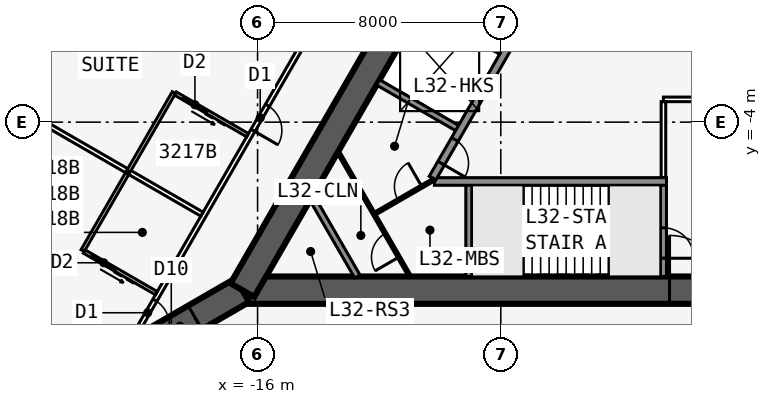
"""IFC4 building model, lengths in metres.
Left out: names, types, materials, properties, quantities, classifications, styles, units other than length and angle.
Written with IfcOpenShell. Run it as: python <this file> out.ifc"""

import sys

from ifc_helpers import new_model, si_unit, direction, frame, frame_2d, origin, place, context, subcontext, project, spatial, rectangle, extrude, element, fill, save


model = new_model("IFC4")
c1 = context("Model", 3, precision=1e-05, world=origin(), true_north=direction((0.0, 1.0)))
c2 = subcontext(c1, "Body", "Model", "MODEL_VIEW")
j1 = project(units=[si_unit("LENGTHUNIT", "METRE"), si_unit("PLANEANGLEUNIT", "RADIAN")], contexts=[c1])
p1 = place(None, origin())
s1 = spatial("IfcSite", under=j1, at=p1, CompositionType="ELEMENT")
p2 = place(p1, origin())
s2 = spatial("IfcBuilding", under=s1, at=p2, CompositionType="ELEMENT")
p3 = place(p2, frame((0.0, 0.0, 124.9)))
s3 = spatial("IfcBuildingStorey", under=s2, at=p3, CompositionType="ELEMENT", Elevation=124.9)
p4 = place(p3, frame((-16.5, -9.526, 0.0), z_axis=(0.0, 0.0, 1.0), x_axis=(1.0, 0.0, 0.0)))
e1 = element("IfcWall", 1, at=p4, inside=s3, PredefinedType="SHEAR", context=c2, shape_type="SweptSolid", body=[
    extrude(rectangle(XDim=33.0, YDim=0.9, at=frame_2d((16.5, 0.0))), origin(), (0.0, 0.0, 1.0), 3.4),
])
p5 = place(p4, frame((14.05, 0.0, 0.0)))
e2 = element("IfcOpeningElement", 2, at=p5, cuts=e1, PredefinedType="OPENING", context=c2, shape_type="SweptSolid", body=[
    extrude(rectangle(XDim=1.8, YDim=2.13, at=frame_2d((0.9, 1.065))), frame((0.0, 0.46, 0.0), z_axis=(0.0, -1.0, 0.0), x_axis=(1.0, 0.0, 0.0)), (0.0, 0.0, 1.0), 0.92),
])
p6 = place(p3, frame((-10.183, -5.951, 0.0), z_axis=(0.0, 0.0, 1.0), x_axis=(1.0, 0.0, 0.0)))
e3 = element("IfcWall", 3, at=p6, inside=s3, PredefinedType="SOLIDWALL", context=c2, shape_type="SweptSolid", body=[
    extrude(rectangle(XDim=7.633, YDim=0.25, at=frame_2d((3.816, 0.0))), origin(), (0.0, 0.0, 1.0), 3.235),
])
p7 = place(p3, frame((-9.05, -5.951, 0.0), z_axis=(0.0, 0.0, 1.0), x_axis=(0.0, -1.0, 0.0)))
e4 = element("IfcWall", 4, at=p7, inside=s3, PredefinedType="SOLIDWALL", context=c2, shape_type="SweptSolid", body=[
    extrude(rectangle(XDim=3.125, YDim=0.2, at=frame_2d((1.562, 0.0))), origin(), (0.0, 0.0, 1.0), 3.235),
])
p8 = place(p3, frame((-2.65, -5.951, 0.0), z_axis=(0.0, 0.0, 1.0), x_axis=(0.0, -1.0, 0.0)))
e5 = element("IfcWall", 5, at=p8, inside=s3, PredefinedType="SOLIDWALL", context=c2, shape_type="SweptSolid", body=[
    extrude(rectangle(XDim=3.125, YDim=0.2, at=frame_2d((1.562, 0.0))), origin(), (0.0, 0.0, 1.0), 3.235),
])
p9 = place(p8, frame((1.525, 0.0, 0.0)))
e6 = element("IfcOpeningElement", 6, at=p9, cuts=e5, PredefinedType="OPENING", context=c2, shape_type="SweptSolid", body=[
    extrude(rectangle(XDim=1.0, YDim=2.13, at=frame_2d((0.5, 1.065))), frame((0.0, 0.11, 0.0), z_axis=(0.0, -1.0, 0.0), x_axis=(1.0, 0.0, 0.0)), (0.0, 0.0, 1.0), 0.22),
])
p10 = place(p3, frame((0.0, 19.052, 0.0), z_axis=(0.0, 0.0, 1.0), x_axis=(-0.499999749417, -0.866025548458, 0.0)))
e7 = element("IfcWall", 7, at=p10, inside=s3, PredefinedType="SHEAR", context=c2, shape_type="SweptSolid", body=[
    extrude(rectangle(XDim=33.0, YDim=0.9, at=frame_2d((16.5, 0.0))), origin(), (0.0, 0.0, 1.0), 3.4),
])
p11 = place(p10, frame((14.15, 0.0, 0.0)))
e8 = element("IfcOpeningElement", 8, at=p11, cuts=e7, PredefinedType="OPENING", context=c2, shape_type="SweptSolid", body=[
    extrude(rectangle(XDim=1.8, YDim=2.13, at=frame_2d((0.9, 1.065))), frame((0.0, 0.46, 0.0), z_axis=(0.0, -1.0, 0.0), x_axis=(1.0, 0.0, 0.0)), (0.0, 0.0, 1.0), 0.92),
])
p12 = place(p10, frame((12.6, 0.0, 0.0)))
e9 = element("IfcOpeningElement", 9, at=p12, cuts=e7, PredefinedType="OPENING", context=c2, shape_type="SweptSolid", body=[
    extrude(rectangle(XDim=1.0, YDim=2.13, at=frame_2d((0.5, 1.065))), frame((0.0, 0.46, 0.0), z_axis=(0.0, -1.0, 0.0), x_axis=(1.0, 0.0, 0.0)), (0.0, 0.0, 1.0), 0.92),
])
p13 = place(p3, frame((-4.929, 3.365, 0.0), z_axis=(0.0, 0.0, 1.0), x_axis=(-0.499991433582, -0.866030349552, 0.0)))
e10 = element("IfcWall", 10, at=p13, inside=s3, PredefinedType="SOLIDWALL", context=c2, shape_type="SweptSolid", body=[
    extrude(rectangle(XDim=10.633, YDim=0.25, at=frame_2d((5.316, 0.0))), origin(), (0.0, 0.0, 1.0), 3.235),
])
p14 = place(p13, frame((9.164, 0.0, 0.0)))
e11 = element("IfcOpeningElement", 11, at=p14, cuts=e10, PredefinedType="OPENING", context=c2, shape_type="SweptSolid", body=[
    extrude(rectangle(XDim=0.9, YDim=2.13, at=frame_2d((0.45, 1.065))), frame((0.0, 0.135, 0.0), z_axis=(0.0, -1.0, 0.0), x_axis=(1.0, 0.0, 0.0)), (0.0, 0.0, 1.0), 0.27),
])
for number, where, z_axis, x_axis in (
    (12, (-7.879, -1.744, 0.0), (0.0, 0.0, 1.0), (-0.866, 0.5, 0.0)),
    (13, (-9.329, -4.256, 0.0), (0.0, 0.0, 1.0), (-0.866, 0.5, 0.0)),
):
    element("IfcWall", number, at=place(p3, frame(where, z_axis=z_axis, x_axis=x_axis)), inside=s3, PredefinedType="SOLIDWALL", context=c2, shape_type="SweptSolid", body=[
        extrude(rectangle(XDim=3.125, YDim=0.2, at=frame_2d((1.562, 0.0))), origin(), (0.0, 0.0, 1.0), 3.235),
    ])
p15 = place(p3, frame((-16.5, -9.526, 0.0), z_axis=(0.0, 0.0, 1.0), x_axis=(-0.866031398331, -0.499989616998, 0.0)))
e14 = element("IfcWall", 14, at=p15, inside=s3, PredefinedType="SHEAR", context=c2, shape_type="SweptSolid", body=[
    extrude(rectangle(XDim=4.746, YDim=0.9, at=frame_2d((2.373, 0.0))), origin(), (0.0, 0.0, 1.0), 3.4),
])
p16 = place(p15, frame((1.8, 0.0, 0.0)))
e15 = element("IfcOpeningElement", 15, at=p16, cuts=e14, PredefinedType="OPENING", context=c2, shape_type="SweptSolid", body=[
    extrude(rectangle(XDim=1.8, YDim=2.13, at=frame_2d((0.9, 1.065))), frame((0.0, 0.46, 0.0), z_axis=(0.0, -1.0, 0.0), x_axis=(1.0, 0.0, 0.0)), (0.0, 0.0, 1.0), 0.92),
])
p17 = place(p3, frame((-22.701, 1.584, 0.0), z_axis=(0.0, 0.0, 1.0), x_axis=(-0.343225593282, -0.939252996863, 0.0)))
e16 = element("IfcWall", 16, at=p17, inside=s3, PredefinedType="STANDARD", context=c2, shape_type="SweptSolid", body=[
    extrude(rectangle(XDim=5.076, YDim=0.25, at=frame_2d((2.538, 0.0))), origin(), (0.0, 0.0, 1.0), 3.235),
])
p18 = place(p17, frame((0.738, 0.0, 0.45)))
e17 = element("IfcOpeningElement", 17, at=p18, cuts=e16, PredefinedType="OPENING", context=c2, shape_type="SweptSolid", body=[
    extrude(rectangle(XDim=3.6, YDim=2.4, at=frame_2d((1.8, 1.2))), frame((0.0, 0.135, 0.0), z_axis=(0.0, -1.0, 0.0), x_axis=(1.0, 0.0, 0.0)), (0.0, 0.0, 1.0), 0.27),
])
p19 = place(p3, frame((-0.5, 22.836, 0.0), z_axis=(0.0, 0.0, 1.0), x_axis=(-0.500001677587, -0.866024435227, 0.0)))
e18 = element("IfcWall", 18, at=p19, inside=s3, PredefinedType="PARTITIONING", context=c2, shape_type="SweptSolid", body=[
    extrude(rectangle(XDim=39.054, YDim=0.15, at=frame_2d((19.527, 0.0))), origin(), (0.0, 0.0, 1.0), 3.235),
])
p20 = place(p19, frame((0.352, 0.0, 0.0)))
e19 = element("IfcOpeningElement", 19, at=p20, cuts=e18, PredefinedType="OPENING", context=c2, shape_type="SweptSolid", body=[
    extrude(rectangle(XDim=0.95, YDim=2.13, at=frame_2d((0.475, 1.065))), frame((0.0, 0.085, 0.0), z_axis=(0.0, -1.0, 0.0), x_axis=(1.0, 0.0, 0.0)), (0.0, 0.0, 1.0), 0.17),
])
p21 = place(p19, frame((5.952, 0.0, 0.0)))
e20 = element("IfcOpeningElement", 20, at=p21, cuts=e18, PredefinedType="OPENING", context=c2, shape_type="SweptSolid", body=[
    extrude(rectangle(XDim=0.95, YDim=2.13, at=frame_2d((0.475, 1.065))), frame((0.0, 0.085, 0.0), z_axis=(0.0, -1.0, 0.0), x_axis=(1.0, 0.0, 0.0)), (0.0, 0.0, 1.0), 0.17),
])
p22 = place(p19, frame((12.152, 0.0, 0.0)))
e21 = element("IfcOpeningElement", 21, at=p22, cuts=e18, PredefinedType="OPENING", context=c2, shape_type="SweptSolid", body=[
    extrude(rectangle(XDim=0.95, YDim=2.13, at=frame_2d((0.475, 1.065))), frame((0.0, 0.085, 0.0), z_axis=(0.0, -1.0, 0.0), x_axis=(1.0, 0.0, 0.0)), (0.0, 0.0, 1.0), 0.17),
])
p23 = place(p19, frame((15.352, 0.0, 0.0)))
e22 = element("IfcOpeningElement", 22, at=p23, cuts=e18, PredefinedType="OPENING", context=c2, shape_type="SweptSolid", body=[
    extrude(rectangle(XDim=0.95, YDim=2.13, at=frame_2d((0.475, 1.065))), frame((0.0, 0.085, 0.0), z_axis=(0.0, -1.0, 0.0), x_axis=(1.0, 0.0, 0.0)), (0.0, 0.0, 1.0), 0.17),
])
p24 = place(p19, frame((22.152, 0.0, 0.0)))
e23 = element("IfcOpeningElement", 23, at=p24, cuts=e18, PredefinedType="OPENING", context=c2, shape_type="SweptSolid", body=[
    extrude(rectangle(XDim=0.95, YDim=2.13, at=frame_2d((0.475, 1.065))), frame((0.0, 0.085, 0.0), z_axis=(0.0, -1.0, 0.0), x_axis=(1.0, 0.0, 0.0)), (0.0, 0.0, 1.0), 0.17),
])
p25 = place(p19, frame((30.352, 0.0, 0.0)))
e24 = element("IfcOpeningElement", 24, at=p25, cuts=e18, PredefinedType="OPENING", context=c2, shape_type="SweptSolid", body=[
    extrude(rectangle(XDim=0.95, YDim=2.13, at=frame_2d((0.475, 1.065))), frame((0.0, 0.085, 0.0), z_axis=(0.0, -1.0, 0.0), x_axis=(1.0, 0.0, 0.0)), (0.0, 0.0, 1.0), 0.17),
])
p26 = place(p19, frame((37.752, 0.0, 0.0)))
e25 = element("IfcOpeningElement", 25, at=p26, cuts=e18, PredefinedType="OPENING", context=c2, shape_type="SweptSolid", body=[
    extrude(rectangle(XDim=0.95, YDim=2.13, at=frame_2d((0.475, 1.065))), frame((0.0, 0.085, 0.0), z_axis=(0.0, -1.0, 0.0), x_axis=(1.0, 0.0, 0.0)), (0.0, 0.0, 1.0), 0.17),
])
p27 = place(p3, frame((-17.829, -7.027, 0.0), z_axis=(0.0, 0.0, 1.0), x_axis=(-0.866029804378, 0.499992377871, 0.0)))
e26 = element("IfcWall", 26, at=p27, inside=s3, PredefinedType="PARTITIONING", context=c2, shape_type="SweptSolid", body=[
    extrude(rectangle(XDim=7.516, YDim=0.15, at=frame_2d((3.758, 0.0))), origin(), (0.0, 0.0, 1.0), 2.389),
])
p28 = place(p3, frame((-18.753, -3.029, 0.0), z_axis=(0.0, 0.0, 1.0), x_axis=(-0.50002537861, -0.866010750942, 0.0)))
e27 = element("IfcWall", 27, at=p28, inside=s3, PredefinedType="PLUMBINGWALL", context=c2, shape_type="SweptSolid", body=[
    extrude(rectangle(XDim=3.0, YDim=0.12, at=frame_2d((1.5, 0.0))), origin(), (0.0, 0.0, 1.0), 3.235),
])
p29 = place(p3, frame((-16.329, -4.429, 0.0), z_axis=(0.0, 0.0, 1.0), x_axis=(-0.865997131366, 0.500048966069, 0.0)))
e28 = element("IfcWall", 28, at=p29, inside=s3, PredefinedType="PLUMBINGWALL", context=c2, shape_type="SweptSolid", body=[
    extrude(rectangle(XDim=2.74, YDim=0.12, at=frame_2d((1.37, 0.0))), origin(), (0.0, 0.0, 1.0), 3.235),
])
p30 = place(p29, frame((1.55, 0.0, 0.0)))
e29 = element("IfcOpeningElement", 29, at=p30, cuts=e28, PredefinedType="OPENING", context=c2, shape_type="SweptSolid", body=[
    extrude(rectangle(XDim=0.9, YDim=2.13, at=frame_2d((0.45, 1.065))), frame((0.0, 0.07, 0.0), z_axis=(0.0, -1.0, 0.0), x_axis=(1.0, 0.0, 0.0)), (0.0, 0.0, 1.0), 0.14),
])
p31 = place(p3, frame((-20.253, -5.627, 0.0), z_axis=(0.0, 0.0, 1.0), x_axis=(-0.499990139034, -0.866031096941, 0.0)))
e30 = element("IfcWall", 30, at=p31, inside=s3, PredefinedType="PLUMBINGWALL", context=c2, shape_type="SweptSolid", body=[
    extrude(rectangle(XDim=3.0, YDim=0.12, at=frame_2d((1.5, 0.0))), origin(), (0.0, 0.0, 1.0), 3.235),
])
p32 = place(p3, frame((-19.329, -9.625, 0.0), z_axis=(0.0, 0.0, 1.0), x_axis=(-0.866035715982, 0.499982138324, 0.0)))
e31 = element("IfcWall", 31, at=p32, inside=s3, PredefinedType="PLUMBINGWALL", context=c2, shape_type="SweptSolid", body=[
    extrude(rectangle(XDim=2.74, YDim=0.12, at=frame_2d((1.37, 0.0))), origin(), (0.0, 0.0, 1.0), 3.235),
])
p33 = place(p32, frame((1.55, 0.0, 0.0)))
e32 = element("IfcOpeningElement", 32, at=p33, cuts=e31, PredefinedType="OPENING", context=c2, shape_type="SweptSolid", body=[
    extrude(rectangle(XDim=0.9, YDim=2.13, at=frame_2d((0.45, 1.065))), frame((0.0, 0.07, 0.0), z_axis=(0.0, -1.0, 0.0), x_axis=(1.0, 0.0, 0.0)), (0.0, 0.0, 1.0), 0.14),
])
p34 = place(p3, frame((-2.65, -3.251, 0.0), z_axis=(0.0, 0.0, 1.0), x_axis=(1.0, 0.0, 0.0)))
e33 = element("IfcWall", 33, at=p34, inside=s3, PredefinedType="PARTITIONING", context=c2, shape_type="SweptSolid", body=[
    extrude(rectangle(XDim=8.35, YDim=0.15, at=frame_2d((4.175, 0.0))), origin(), (0.0, 0.0, 1.0), 3.235),
])
p35 = place(p3, frame((-2.65, -5.826, 0.0), z_axis=(0.0, 0.0, 1.0), x_axis=(0.0, 1.0, 0.0)))
e34 = element("IfcWall", 34, at=p35, inside=s3, PredefinedType="PARTITIONING", context=c2, shape_type="SweptSolid", body=[
    extrude(rectangle(XDim=2.5, YDim=0.15, at=frame_2d((1.25, 0.0))), origin(), (0.0, 0.0, 1.0), 3.235),
])
p36 = place(p3, frame((-12.719, -9.076, 0.0), z_axis=(0.0, 0.0, 1.0), x_axis=(-0.499952404951, 0.866052881055, 0.0)))
e35 = element("IfcWall", 35, at=p36, inside=s3, PredefinedType="SOLIDWALL", context=c2, shape_type="SweptSolid", body=[
    extrude(rectangle(XDim=3.002, YDim=0.2, at=frame_2d((1.501, 0.0))), origin(), (0.0, 0.0, 1.0), 3.235),
])
p37 = place(p3, frame((-10.986, -9.076, 0.0), z_axis=(0.0, 0.0, 1.0), x_axis=(-0.499999210213, 0.866025859768, 0.0)))
e36 = element("IfcWall", 36, at=p37, inside=s3, PredefinedType="PARTITIONING", context=c2, shape_type="SweptSolid", body=[
    extrude(rectangle(XDim=4.734, YDim=0.1, at=frame_2d((2.367, 0.0))), origin(), (0.0, 0.0, 1.0), 3.235),
])
p38 = place(p37, frame((0.734, 0.0, 0.0)))
e37 = element("IfcOpeningElement", 37, at=p38, cuts=e36, PredefinedType="OPENING", context=c2, shape_type="SweptSolid", body=[
    extrude(rectangle(XDim=0.9, YDim=2.13, at=frame_2d((0.45, 1.065))), frame((0.0, 0.06, 0.0), z_axis=(0.0, -1.0, 0.0), x_axis=(1.0, 0.0, 0.0)), (0.0, 0.0, 1.0), 0.12),
])
p39 = place(p3, frame((-12.17, -7.026, 0.0), z_axis=(0.0, 0.0, 1.0), x_axis=(0.866015833478, 0.50001657589, 0.0)))
e38 = element("IfcWall", 38, at=p39, inside=s3, PredefinedType="PARTITIONING", context=c2, shape_type="SweptSolid", body=[
    extrude(rectangle(XDim=2.275, YDim=0.1, at=frame_2d((1.138, 0.0))), origin(), (0.0, 0.0, 1.0), 3.235),
])
p40 = place(p39, frame((0.915, 0.0, 0.0)))
e39 = element("IfcOpeningElement", 39, at=p40, cuts=e38, PredefinedType="OPENING", context=c2, shape_type="SweptSolid", body=[
    extrude(rectangle(XDim=0.9, YDim=2.13, at=frame_2d((0.45, 1.065))), frame((0.0, 0.06, 0.0), z_axis=(0.0, -1.0, 0.0), x_axis=(1.0, 0.0, 0.0)), (0.0, 0.0, 1.0), 0.12),
])
p41 = place(p3, frame((-7.247, -7.576, 0.0), z_axis=(0.0, 0.0, 1.0), x_axis=(1.0, 0.0, 0.0)))
e40 = element("IfcWall", 40, at=p41, inside=s3, PredefinedType="SOLIDWALL", context=c2, shape_type="SweptSolid", body=[
    extrude(rectangle(XDim=2.794, YDim=0.1, at=frame_2d((1.397, 0.0))), origin(), (0.0, 0.0, 1.0), 3.4),
])
p42 = place(p30, origin())
e41 = element("IfcDoor", 41, at=p42, inside=s3, OperationType="SLIDING_TO_LEFT", PredefinedType="DOOR", context=c2, shape_type="SweptSolid", body=[
    extrude(rectangle(XDim=0.9, YDim=2.13, at=frame_2d((0.45, 1.065))), frame((0.0, 0.025, 0.0), z_axis=(0.0, -1.0, 0.0), x_axis=(1.0, 0.0, 0.0)), (0.0, 0.0, 1.0), 0.05),
])
fill(e29, e41)
p43 = place(p25, origin())
e42 = element("IfcDoor", 42, at=p43, inside=s3, OperationType="SINGLE_SWING_RIGHT", PredefinedType="DOOR", context=c2, shape_type="SweptSolid", body=[
    extrude(rectangle(XDim=0.95, YDim=2.13, at=frame_2d((0.475, 1.065))), frame((0.0, 0.025, 0.0), z_axis=(0.0, -1.0, 0.0), x_axis=(1.0, 0.0, 0.0)), (0.0, 0.0, 1.0), 0.05),
])
fill(e24, e42)
p44 = place(p33, origin())
e43 = element("IfcDoor", 43, at=p44, inside=s3, OperationType="SLIDING_TO_LEFT", PredefinedType="DOOR", context=c2, shape_type="SweptSolid", body=[
    extrude(rectangle(XDim=0.9, YDim=2.13, at=frame_2d((0.45, 1.065))), frame((0.0, 0.025, 0.0), z_axis=(0.0, -1.0, 0.0), x_axis=(1.0, 0.0, 0.0)), (0.0, 0.0, 1.0), 0.05),
])
fill(e32, e43)
p45 = place(p26, origin())
e44 = element("IfcDoor", 44, at=p45, inside=s3, OperationType="SINGLE_SWING_RIGHT", PredefinedType="DOOR", context=c2, shape_type="SweptSolid", body=[
    extrude(rectangle(XDim=0.95, YDim=2.13, at=frame_2d((0.475, 1.065))), frame((0.0, 0.025, 0.0), z_axis=(0.0, -1.0, 0.0), x_axis=(1.0, 0.0, 0.0)), (0.0, 0.0, 1.0), 0.05),
])
fill(e25, e44)
p46 = place(p5, origin())
e45 = element("IfcDoor", 45, at=p46, inside=s3, OperationType="DOUBLE_DOOR_SINGLE_SWING", PredefinedType="DOOR", context=c2, shape_type="SweptSolid", body=[
    extrude(rectangle(XDim=1.8, YDim=2.13, at=frame_2d((0.9, 1.065))), frame((0.0, 0.025, 0.0), z_axis=(0.0, -1.0, 0.0), x_axis=(1.0, 0.0, 0.0)), (0.0, 0.0, 1.0), 0.05),
])
fill(e2, e45)
p47 = place(p9, origin())
e46 = element("IfcDoor", 46, at=p47, inside=s3, OperationType="SINGLE_SWING_RIGHT", PredefinedType="DOOR", context=c2, shape_type="SweptSolid", body=[
    extrude(rectangle(XDim=1.0, YDim=2.13, at=frame_2d((0.5, 1.065))), frame((0.0, 0.025, 0.0), z_axis=(0.0, -1.0, 0.0), x_axis=(1.0, 0.0, 0.0)), (0.0, 0.0, 1.0), 0.05),
])
fill(e6, e46)
p48 = place(p16, origin())
e47 = element("IfcDoor", 47, at=p48, inside=s3, OperationType="DOUBLE_DOOR_DOUBLE_SWING", PredefinedType="DOOR", context=c2, shape_type="SweptSolid", body=[
    extrude(rectangle(XDim=1.8, YDim=2.13, at=frame_2d((0.9, 1.065))), frame((0.0, 0.025, 0.0), z_axis=(0.0, -1.0, 0.0), x_axis=(1.0, 0.0, 0.0)), (0.0, 0.0, 1.0), 0.05),
])
fill(e15, e47)
p49 = place(p38, origin())
e48 = element("IfcDoor", 48, at=p49, inside=s3, OperationType="SINGLE_SWING_LEFT", PredefinedType="DOOR", context=c2, shape_type="SweptSolid", body=[
    extrude(rectangle(XDim=0.9, YDim=2.13, at=frame_2d((0.45, 1.065))), frame((0.0, 0.025, 0.0), z_axis=(0.0, -1.0, 0.0), x_axis=(1.0, 0.0, 0.0)), (0.0, 0.0, 1.0), 0.05),
])
fill(e37, e48)
p50 = place(p14, origin())
e49 = element("IfcDoor", 49, at=p50, inside=s3, OperationType="SINGLE_SWING_RIGHT", PredefinedType="DOOR", context=c2, shape_type="SweptSolid", body=[
    extrude(rectangle(XDim=0.9, YDim=2.13, at=frame_2d((0.45, 1.065))), frame((0.0, 0.025, 0.0), z_axis=(0.0, -1.0, 0.0), x_axis=(1.0, 0.0, 0.0)), (0.0, 0.0, 1.0), 0.05),
])
fill(e11, e49)
p51 = place(p40, origin())
e50 = element("IfcDoor", 50, at=p51, inside=s3, OperationType="SINGLE_SWING_RIGHT", PredefinedType="DOOR", context=c2, shape_type="SweptSolid", body=[
    extrude(rectangle(XDim=0.9, YDim=2.13, at=frame_2d((0.45, 1.065))), frame((0.0, 0.025, 0.0), z_axis=(0.0, -1.0, 0.0), x_axis=(1.0, 0.0, 0.0)), (0.0, 0.0, 1.0), 0.05),
])
fill(e39, e50)
save(model, sys.argv[1])
